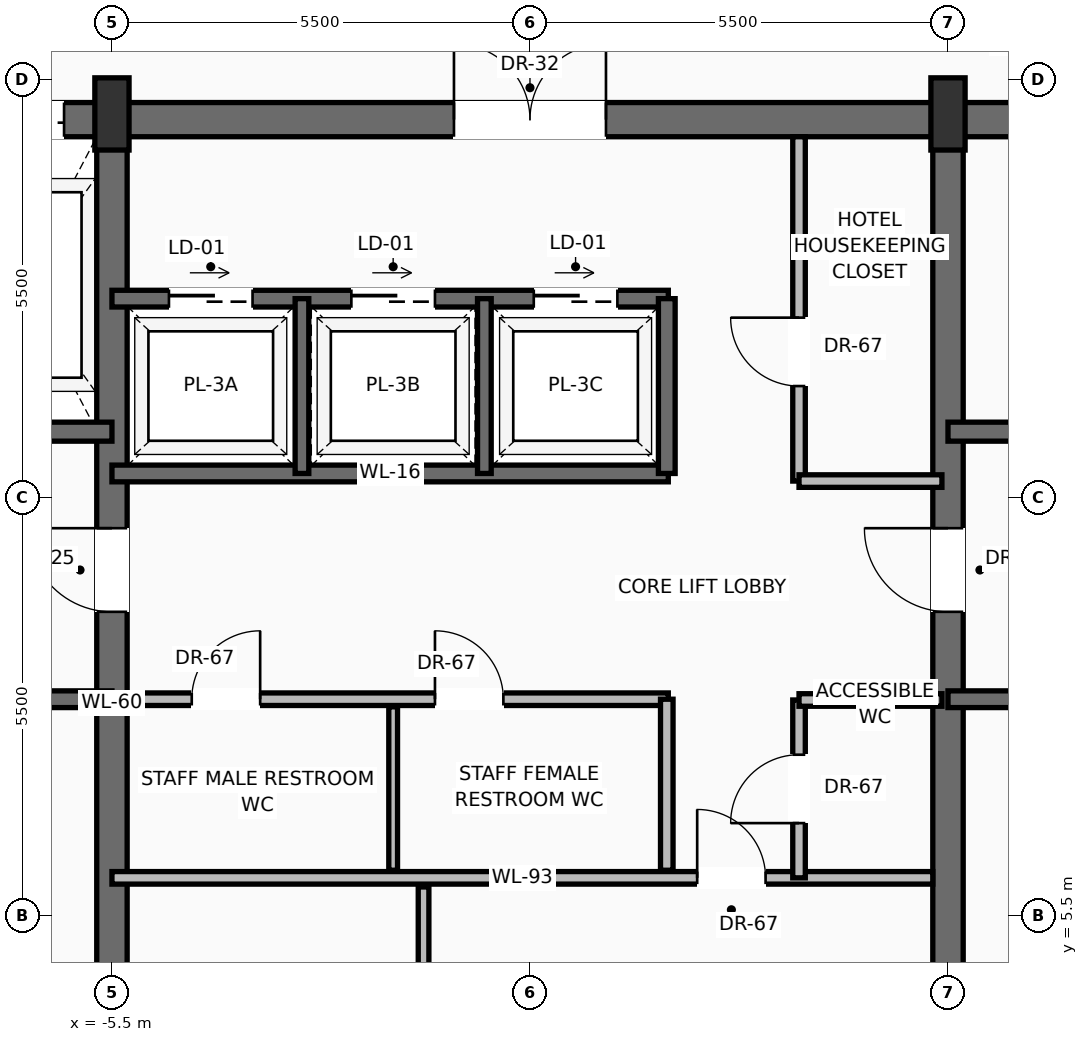
"""IFC4 building model, lengths in metres.
Left out: names, types, materials, properties, quantities, classifications, styles, units other than length and angle.
Written with IfcOpenShell. Run it as: python <this file> out.ifc"""

import sys

from ifc_helpers import new_model, si_unit, direction, frame, frame_2d, origin, origin_2d, place, context, subcontext, project, spatial, rectangle, extrude, source, transform, mapped, element, fill, save


model = new_model("IFC4")
c1 = context("Model", 3, precision=1e-05, world=origin(), true_north=direction((0.0, 1.0)))
c2 = subcontext(c1, "Body", "Model", "MODEL_VIEW")
j1 = project(units=[si_unit("LENGTHUNIT", "METRE"), si_unit("PLANEANGLEUNIT", "RADIAN")], contexts=[c1])
p1 = place(None, origin())
s1 = spatial("IfcSite", under=j1, at=p1, CompositionType="ELEMENT")
p2 = place(p1, origin())
s2 = spatial("IfcBuilding", under=s1, at=p2, CompositionType="ELEMENT")
p3 = place(p2, frame((0.0, 0.0, 269.55)))
s3 = spatial("IfcBuildingStorey", under=s2, at=p3, CompositionType="ELEMENT", Elevation=269.55)
p4 = place(p3, frame((-10.6, 15.975, 0.0), z_axis=(0.0, 0.0, 1.0), x_axis=(1.0, 0.0, 0.0)))
e1 = element("IfcWall", 1, at=p4, inside=s3, PredefinedType="SHEAR", context=c2, shape_type="SweptSolid", body=[
    extrude(rectangle(XDim=21.2, YDim=0.45, at=frame_2d((10.6, 0.0))), origin(), (0.0, 0.0, 1.0), 3.24),
])
p5 = place(p4, frame((3.17, 0.0, 0.0)))
e2 = element("IfcOpeningElement", 2, at=p5, cuts=e1, PredefinedType="OPENING", context=c2, shape_type="SweptSolid", body=[
    extrude(rectangle(XDim=1.3, YDim=2.3, at=frame_2d((0.65, 1.15))), frame((0.0, 0.235, 0.0), z_axis=(0.0, -1.0, 0.0), x_axis=(1.0, 0.0, 0.0)), (0.0, 0.0, 1.0), 0.47),
])
p6 = place(p4, frame((9.6, 0.0, 0.0)))
e3 = element("IfcOpeningElement", 3, at=p6, cuts=e1, PredefinedType="OPENING", context=c2, shape_type="SweptSolid", body=[
    extrude(rectangle(XDim=2.0, YDim=2.4, at=frame_2d((1.0, 1.2))), frame((0.0, 0.235, 0.0), z_axis=(0.0, -1.0, 0.0), x_axis=(1.0, 0.0, 0.0)), (0.0, 0.0, 1.0), 0.47),
])
p7 = place(p3, frame((-5.5, 0.625, 0.0), z_axis=(0.0, 0.0, 1.0), x_axis=(0.0, 1.0, 0.0)))
e4 = element("IfcWall", 4, at=p7, inside=s3, PredefinedType="SHEAR", context=c2, shape_type="SweptSolid", body=[
    extrude(rectangle(XDim=15.35, YDim=0.4, at=frame_2d((7.675, 0.0))), origin(), (0.0, 0.0, 1.0), 3.24),
])
p8 = place(p7, frame((8.875, 0.0, 0.0)))
e5 = element("IfcOpeningElement", 5, at=p8, cuts=e4, PredefinedType="OPENING", context=c2, shape_type="SweptSolid", body=[
    extrude(rectangle(XDim=1.1, YDim=2.2, at=frame_2d((0.55, 1.1))), frame((0.0, 0.21, 0.0), z_axis=(0.0, -1.0, 0.0), x_axis=(1.0, 0.0, 0.0)), (0.0, 0.0, 1.0), 0.42),
])
p9 = place(p3, frame((5.5, 0.625, 0.0), z_axis=(0.0, 0.0, 1.0), x_axis=(0.0, 1.0, 0.0)))
e6 = element("IfcWall", 6, at=p9, inside=s3, PredefinedType="SHEAR", context=c2, shape_type="SweptSolid", body=[
    extrude(rectangle(XDim=15.35, YDim=0.4, at=frame_2d((7.675, 0.0))), origin(), (0.0, 0.0, 1.0), 3.24),
])
p10 = place(p9, frame((8.875, 0.0, 0.0)))
e7 = element("IfcOpeningElement", 7, at=p10, cuts=e6, PredefinedType="OPENING", context=c2, shape_type="SweptSolid", body=[
    extrude(rectangle(XDim=1.1, YDim=2.2, at=frame_2d((0.55, 1.1))), frame((0.0, 0.21, 0.0), z_axis=(0.0, -1.0, 0.0), x_axis=(1.0, 0.0, 0.0)), (0.0, 0.0, 1.0), 0.42),
])
m1 = source(origin(), c2, "Body", "SweptSolid", [
    extrude(rectangle(XDim=0.45, YDim=0.95, at=origin_2d()), origin(), (0.0, 0.0, 1.0), 3.45),
])
for number, where, z_axis, x_axis in (
    (8, (-5.5, 16.05, 0.0), (0.0, 0.0, 1.0), (1.0, 0.0, 0.0)),
    (9, (5.5, 16.05, 0.0), (0.0, 0.0, 1.0), (1.0, 0.0, 0.0)),
):
    element("IfcColumn", number, at=place(p3, frame(where, z_axis=z_axis, x_axis=x_axis)), inside=s3, PredefinedType="PILASTER", context=c2, shape_type="MappedRepresentation", body=[
        mapped(m1, transform((0.0, 0.0, 0.0), scale=1.0)),
    ])
p11 = place(p3, frame((-5.5, 8.35, 0.0), z_axis=(0.0, 0.0, 1.0), x_axis=(-1.0, 0.0, 0.0)))
e10 = element("IfcWall", 10, at=p11, inside=s3, PredefinedType="SOLIDWALL", context=c2, shape_type="SweptSolid", body=[
    extrude(rectangle(XDim=4.65, YDim=0.22, at=frame_2d((2.325, 0.0))), origin(), (0.0, 0.0, 1.0), 3.24),
])
p12 = place(p11, frame((2.5, 0.0, 0.0)))
e11 = element("IfcOpeningElement", 11, at=p12, cuts=e10, PredefinedType="OPENING", context=c2, shape_type="SweptSolid", body=[
    extrude(rectangle(XDim=1.15, YDim=2.2, at=frame_2d((0.575, 1.1))), frame((0.0, 0.12, 0.0), z_axis=(0.0, -1.0, 0.0), x_axis=(1.0, 0.0, 0.0)), (0.0, 0.0, 1.0), 0.24),
])
p13 = place(p3, frame((-5.5, 11.87, 0.0), z_axis=(0.0, 0.0, 1.0), x_axis=(-1.0, 0.0, 0.0)))
e12 = element("IfcWall", 12, at=p13, inside=s3, PredefinedType="SOLIDWALL", context=c2, shape_type="SweptSolid", body=[
    extrude(rectangle(XDim=4.65, YDim=0.25, at=frame_2d((2.325, 0.0))), origin(), (0.0, 0.0, 1.0), 3.24),
])
p14 = place(p13, frame((2.95, 0.0, 0.0)))
e13 = element("IfcOpeningElement", 13, at=p14, cuts=e12, PredefinedType="OPENING", context=c2, shape_type="SweptSolid", body=[
    extrude(rectangle(XDim=1.2, YDim=2.25, at=frame_2d((0.6, 1.125))), frame((0.0, 0.135, 0.0), z_axis=(0.0, -1.0, 0.0), x_axis=(1.0, 0.0, 0.0)), (0.0, 0.0, 1.0), 0.27),
])
p15 = place(p3, frame((10.15, 8.35, 0.0), z_axis=(0.0, 0.0, 1.0), x_axis=(-1.0, 0.0, 0.0)))
e14 = element("IfcWall", 14, at=p15, inside=s3, PredefinedType="SOLIDWALL", context=c2, shape_type="SweptSolid", body=[
    extrude(rectangle(XDim=4.65, YDim=0.22, at=frame_2d((2.325, 0.0))), origin(), (0.0, 0.0, 1.0), 3.24),
])
p16 = place(p15, frame((1.0, 0.0, 0.0)))
e15 = element("IfcOpeningElement", 15, at=p16, cuts=e14, PredefinedType="OPENING", context=c2, shape_type="SweptSolid", body=[
    extrude(rectangle(XDim=1.15, YDim=2.2, at=frame_2d((0.575, 1.1))), frame((0.0, 0.12, 0.0), z_axis=(0.0, -1.0, 0.0), x_axis=(1.0, 0.0, 0.0)), (0.0, 0.0, 1.0), 0.24),
])
p17 = place(p3, frame((10.15, 11.87, 0.0), z_axis=(0.0, 0.0, 1.0), x_axis=(-1.0, 0.0, 0.0)))
e16 = element("IfcWall", 16, at=p17, inside=s3, PredefinedType="SOLIDWALL", context=c2, shape_type="SweptSolid", body=[
    extrude(rectangle(XDim=4.65, YDim=0.25, at=frame_2d((2.325, 0.0))), origin(), (0.0, 0.0, 1.0), 3.24),
])
p18 = place(p17, frame((0.5, 0.0, 0.0)))
e17 = element("IfcOpeningElement", 17, at=p18, cuts=e16, PredefinedType="OPENING", context=c2, shape_type="SweptSolid", body=[
    extrude(rectangle(XDim=1.2, YDim=2.25, at=frame_2d((0.6, 1.125))), frame((0.0, 0.135, 0.0), z_axis=(0.0, -1.0, 0.0), x_axis=(1.0, 0.0, 0.0)), (0.0, 0.0, 1.0), 0.27),
])
p19 = place(p3, frame((-5.5, 6.0, 0.0), z_axis=(0.0, 0.0, 1.0), x_axis=(1.0, 0.0, 0.0)))
e18 = element("IfcWall", 18, at=p19, inside=s3, PredefinedType="PARTITIONING", context=c2, shape_type="SweptSolid", body=[
    extrude(rectangle(XDim=10.8, YDim=0.165, at=frame_2d((5.4, 0.0))), origin(), (0.0, 0.0, 1.0), 3.232),
])
p20 = place(p19, frame((7.7, 0.0, 0.0)))
e19 = element("IfcOpeningElement", 19, at=p20, cuts=e18, PredefinedType="OPENING", context=c2, shape_type="SweptSolid", body=[
    extrude(rectangle(XDim=0.9, YDim=2.1, at=frame_2d((0.45, 1.05))), frame((0.0, 0.093, 0.0), z_axis=(0.0, -1.0, 0.0), x_axis=(1.0, 0.0, 0.0)), (0.0, 0.0, 1.0), 0.185),
])
p21 = place(p3, frame((-1.4, 0.85, 0.0), z_axis=(0.0, 0.0, 1.0), x_axis=(0.0, 1.0, 0.0)))
e20 = element("IfcWall", 20, at=p21, inside=s3, PredefinedType="PARTITIONING", context=c2, shape_type="SweptSolid", body=[
    extrude(rectangle(XDim=5.03, YDim=0.14, at=frame_2d((2.515, 0.0))), origin(), (0.0, 0.0, 1.0), 3.232),
])
p22 = place(p21, frame((2.1, 0.0, 0.0)))
e21 = element("IfcOpeningElement", 21, at=p22, cuts=e20, PredefinedType="OPENING", context=c2, shape_type="SweptSolid", body=[
    extrude(rectangle(XDim=0.9, YDim=2.1, at=frame_2d((0.45, 1.05))), frame((0.0, 0.08, 0.0), z_axis=(0.0, -1.0, 0.0), x_axis=(1.0, 0.0, 0.0)), (0.0, 0.0, 1.0), 0.16),
])
p23 = place(p3, frame((3.54, 6.0, 0.0), z_axis=(0.0, 0.0, 1.0), x_axis=(0.0, 1.0, 0.0)))
e22 = element("IfcWall", 22, at=p23, inside=s3, PredefinedType="PARTITIONING", context=c2, shape_type="SweptSolid", body=[
    extrude(rectangle(XDim=2.34, YDim=0.165, at=frame_2d((1.17, 0.0))), origin(), (0.0, 0.0, 1.0), 3.232),
])
p24 = place(p23, frame((0.72, 0.0, 0.0)))
e23 = element("IfcOpeningElement", 23, at=p24, cuts=e22, PredefinedType="OPENING", context=c2, shape_type="SweptSolid", body=[
    extrude(rectangle(XDim=0.9, YDim=2.1, at=frame_2d((0.45, 1.05))), frame((0.0, 0.093, 0.0), z_axis=(0.0, -1.0, 0.0), x_axis=(1.0, 0.0, 0.0)), (0.0, 0.0, 1.0), 0.185),
])
p25 = place(p3, frame((3.54, 8.34, 0.0), z_axis=(0.0, 0.0, 1.0), x_axis=(1.0, 0.0, 0.0)))
e24 = element("IfcWall", 24, at=p25, inside=s3, PredefinedType="PARTITIONING", context=c2, shape_type="SweptSolid", body=[
    extrude(rectangle(XDim=1.88, YDim=0.165, at=frame_2d((0.94, 0.0))), origin(), (0.0, 0.0, 1.0), 3.232),
])
p26 = place(p3, frame((-5.3, 8.35, 0.0), z_axis=(0.0, 0.0, 1.0), x_axis=(1.0, 0.0, 0.0)))
e25 = element("IfcWall", 25, at=p26, inside=s3, PredefinedType="PARTITIONING", context=c2, shape_type="SweptSolid", body=[
    extrude(rectangle(XDim=7.12, YDim=0.165, at=frame_2d((3.56, 0.0))), origin(), (0.0, 0.0, 1.0), 3.232),
])
p27 = place(p26, frame((0.85, 0.0, 0.0)))
e26 = element("IfcOpeningElement", 26, at=p27, cuts=e25, PredefinedType="OPENING", context=c2, shape_type="SweptSolid", body=[
    extrude(rectangle(XDim=0.9, YDim=2.1, at=frame_2d((0.45, 1.05))), frame((0.0, 0.093, 0.0), z_axis=(0.0, -1.0, 0.0), x_axis=(1.0, 0.0, 0.0)), (0.0, 0.0, 1.0), 0.185),
])
p28 = place(p26, frame((4.05, 0.0, 0.0)))
e27 = element("IfcOpeningElement", 27, at=p28, cuts=e25, PredefinedType="OPENING", context=c2, shape_type="SweptSolid", body=[
    extrude(rectangle(XDim=0.9, YDim=2.1, at=frame_2d((0.45, 1.05))), frame((0.0, 0.093, 0.0), z_axis=(0.0, -1.0, 0.0), x_axis=(1.0, 0.0, 0.0)), (0.0, 0.0, 1.0), 0.185),
])
p29 = place(p3, frame((1.8, 6.1, 0.0), z_axis=(0.0, 0.0, 1.0), x_axis=(0.0, 1.0, 0.0)))
e28 = element("IfcWall", 28, at=p29, inside=s3, PredefinedType="PARTITIONING", context=c2, shape_type="SweptSolid", body=[
    extrude(rectangle(XDim=2.25, YDim=0.165, at=frame_2d((1.125, 0.0))), origin(), (0.0, 0.0, 1.0), 3.232),
])
p30 = place(p3, frame((-1.8, 6.1, 0.0), z_axis=(0.0, 0.0, 1.0), x_axis=(0.0, 1.0, 0.0)))
e29 = element("IfcWall", 29, at=p30, inside=s3, PredefinedType="PARTITIONING", context=c2, shape_type="SweptSolid", body=[
    extrude(rectangle(XDim=2.15, YDim=0.115, at=frame_2d((1.075, 0.0))), origin(), (0.0, 0.0, 1.0), 3.232),
])
p31 = place(p3, frame((-5.5, 11.32, 0.0), z_axis=(0.0, 0.0, 1.0), x_axis=(1.0, 0.0, 0.0)))
e30 = element("IfcWall", 30, at=p31, inside=s3, PredefinedType="SOLIDWALL", context=c2, shape_type="SweptSolid", body=[
    extrude(rectangle(XDim=7.32, YDim=0.22, at=frame_2d((3.66, 0.0))), origin(), (0.0, 0.0, 1.0), 3.24),
])
p32 = place(p3, frame((-5.5, 13.62, 0.0), z_axis=(0.0, 0.0, 1.0), x_axis=(1.0, 0.0, 0.0)))
e31 = element("IfcWall", 31, at=p32, inside=s3, PredefinedType="SOLIDWALL", context=c2, shape_type="SweptSolid", body=[
    extrude(rectangle(XDim=7.32, YDim=0.22, at=frame_2d((3.66, 0.0))), origin(), (0.0, 0.0, 1.0), 3.24),
])
p33 = place(p32, frame((0.75, 0.0, 0.0)))
e32 = element("IfcOpeningElement", 32, at=p33, cuts=e31, PredefinedType="OPENING", context=c2, shape_type="SweptSolid", body=[
    extrude(rectangle(XDim=1.1, YDim=2.2, at=frame_2d((0.55, 1.1))), frame((0.0, 0.12, 0.0), z_axis=(0.0, -1.0, 0.0), x_axis=(1.0, 0.0, 0.0)), (0.0, 0.0, 1.0), 0.24),
])
p34 = place(p32, frame((3.15, 0.0, 0.0)))
e33 = element("IfcOpeningElement", 33, at=p34, cuts=e31, PredefinedType="OPENING", context=c2, shape_type="SweptSolid", body=[
    extrude(rectangle(XDim=1.1, YDim=2.2, at=frame_2d((0.55, 1.1))), frame((0.0, 0.12, 0.0), z_axis=(0.0, -1.0, 0.0), x_axis=(1.0, 0.0, 0.0)), (0.0, 0.0, 1.0), 0.24),
])
p35 = place(p32, frame((5.55, 0.0, 0.0)))
e34 = element("IfcOpeningElement", 34, at=p35, cuts=e31, PredefinedType="OPENING", context=c2, shape_type="SweptSolid", body=[
    extrude(rectangle(XDim=1.1, YDim=2.2, at=frame_2d((0.55, 1.1))), frame((0.0, 0.12, 0.0), z_axis=(0.0, -1.0, 0.0), x_axis=(1.0, 0.0, 0.0)), (0.0, 0.0, 1.0), 0.24),
])
p36 = place(p3, frame((1.8, 11.32, 0.0), z_axis=(0.0, 0.0, 1.0), x_axis=(0.0, 1.0, 0.0)))
e35 = element("IfcWall", 35, at=p36, inside=s3, PredefinedType="SOLIDWALL", context=c2, shape_type="SweptSolid", body=[
    extrude(rectangle(XDim=2.3, YDim=0.22, at=frame_2d((1.15, 0.0))), origin(), (0.0, 0.0, 1.0), 3.24),
])
for number, where, z_axis, x_axis in (
    (36, (-3.0, 11.32, 0.0), (0.0, 0.0, 1.0), (0.0, 1.0, 0.0)),
    (37, (-0.6, 11.32, 0.0), (0.0, 0.0, 1.0), (0.0, 1.0, 0.0)),
):
    element("IfcWall", number, at=place(p3, frame(where, z_axis=z_axis, x_axis=x_axis)), inside=s3, PredefinedType="SOLIDWALL", context=c2, shape_type="SweptSolid", body=[
        extrude(rectangle(XDim=2.3, YDim=0.18, at=frame_2d((1.15, 0.0))), origin(), (0.0, 0.0, 1.0), 3.24),
    ])
p37 = place(p3, frame((3.54, 11.22, 0.0), z_axis=(0.0, 0.0, 1.0), x_axis=(0.0, 1.0, 0.0)))
e38 = element("IfcWall", 38, at=p37, inside=s3, PredefinedType="PARTITIONING", context=c2, shape_type="SweptSolid", body=[
    extrude(rectangle(XDim=4.53, YDim=0.165, at=frame_2d((2.265, 0.0))), origin(), (0.0, 0.0, 1.0), 3.232),
])
p38 = place(p37, frame((1.25, 0.0, 0.0)))
e39 = element("IfcOpeningElement", 39, at=p38, cuts=e38, PredefinedType="OPENING", context=c2, shape_type="SweptSolid", body=[
    extrude(rectangle(XDim=0.9, YDim=2.1, at=frame_2d((0.45, 1.05))), frame((0.0, 0.093, 0.0), z_axis=(0.0, -1.0, 0.0), x_axis=(1.0, 0.0, 0.0)), (0.0, 0.0, 1.0), 0.185),
])
p39 = place(p3, frame((3.54, 11.22, 0.0), z_axis=(0.0, 0.0, 1.0), x_axis=(1.0, 0.0, 0.0)))
e40 = element("IfcWall", 40, at=p39, inside=s3, PredefinedType="PARTITIONING", context=c2, shape_type="SweptSolid", body=[
    extrude(rectangle(XDim=1.88, YDim=0.165, at=frame_2d((0.94, 0.0))), origin(), (0.0, 0.0, 1.0), 3.232),
])
m2 = source(origin(), c2, "Body", "SweptSolid", [
    extrude(rectangle(XDim=1.1, YDim=2.2, at=frame_2d((0.55, 1.1))), frame((0.0, 0.025, 0.0), z_axis=(0.0, -1.0, 0.0), x_axis=(1.0, 0.0, 0.0)), (0.0, 0.0, 1.0), 0.05),
])
p40 = place(p8, origin())
e41 = element("IfcDoor", 41, at=p40, inside=s3, OperationType="SINGLE_SWING_RIGHT", PredefinedType="DOOR", context=c2, shape_type="MappedRepresentation", body=[
    mapped(m2, transform((0.0, 0.0, 0.0), scale=1.0)),
])
fill(e5, e41)
m3 = source(origin(), c2, "Body", "SweptSolid", [
    extrude(rectangle(XDim=1.3, YDim=2.3, at=frame_2d((0.65, 1.15))), frame((0.0, 0.025, 0.0), z_axis=(0.0, -1.0, 0.0), x_axis=(1.0, 0.0, 0.0)), (0.0, 0.0, 1.0), 0.05),
])
p41 = place(p5, origin())
e42 = element("IfcDoor", 42, at=p41, inside=s3, OperationType="SLIDING_TO_RIGHT", PredefinedType="DOOR", context=c2, shape_type="MappedRepresentation", body=[
    mapped(m3, transform((0.0, 0.0, 0.0), scale=1.0)),
])
fill(e2, e42)
p42 = place(p10, origin())
e43 = element("IfcDoor", 43, at=p42, inside=s3, OperationType="SINGLE_SWING_RIGHT", PredefinedType="DOOR", context=c2, shape_type="MappedRepresentation", body=[
    mapped(m2, transform((0.0, 0.0, 0.0), scale=1.0)),
])
fill(e7, e43)
m4 = source(origin(), c2, "Body", "SweptSolid", [
    extrude(rectangle(XDim=2.0, YDim=2.4, at=frame_2d((1.0, 1.2))), frame((0.0, 0.025, 0.0), z_axis=(0.0, -1.0, 0.0), x_axis=(1.0, 0.0, 0.0)), (0.0, 0.0, 1.0), 0.05),
])
p43 = place(p6, origin())
e44 = element("IfcDoor", 44, at=p43, inside=s3, OperationType="DOUBLE_DOOR_SINGLE_SWING", PredefinedType="DOOR", context=c2, shape_type="MappedRepresentation", body=[
    mapped(m4, transform((0.0, 0.0, 0.0), scale=1.0)),
])
fill(e3, e44)
m5 = source(origin(), c2, "Body", "SweptSolid", [
    extrude(rectangle(XDim=0.9, YDim=2.1, at=frame_2d((0.45, 1.05))), frame((0.0, 0.025, 0.0), z_axis=(0.0, -1.0, 0.0), x_axis=(1.0, 0.0, 0.0)), (0.0, 0.0, 1.0), 0.05),
])
p44 = place(p20, origin())
e45 = element("IfcDoor", 45, at=p44, inside=s3, OperationType="SINGLE_SWING_LEFT", PredefinedType="DOOR", context=c2, shape_type="MappedRepresentation", body=[
    mapped(m5, transform((0.0, 0.0, 0.0), scale=1.0)),
])
fill(e19, e45)
p45 = place(p24, origin())
e46 = element("IfcDoor", 46, at=p45, inside=s3, OperationType="SINGLE_SWING_LEFT", PredefinedType="DOOR", context=c2, shape_type="MappedRepresentation", body=[
    mapped(m5, transform((0.0, 0.0, 0.0), scale=1.0)),
])
fill(e23, e46)
p46 = place(p27, origin())
e47 = element("IfcDoor", 47, at=p46, inside=s3, OperationType="SINGLE_SWING_RIGHT", PredefinedType="DOOR", context=c2, shape_type="MappedRepresentation", body=[
    mapped(m5, transform((0.0, 0.0, 0.0), scale=1.0)),
])
fill(e26, e47)
p47 = place(p28, origin())
e48 = element("IfcDoor", 48, at=p47, inside=s3, OperationType="SINGLE_SWING_LEFT", PredefinedType="DOOR", context=c2, shape_type="MappedRepresentation", body=[
    mapped(m5, transform((0.0, 0.0, 0.0), scale=1.0)),
])
fill(e27, e48)
m6 = source(origin(), c2, "Body", "SweptSolid", [
    extrude(rectangle(XDim=1.1, YDim=2.2, at=frame_2d((0.55, 1.1))), frame((0.0, 0.025, 0.0), z_axis=(0.0, -1.0, 0.0), x_axis=(1.0, 0.0, 0.0)), (0.0, 0.0, 1.0), 0.05),
])
p48 = place(p33, origin())
e49 = element("IfcDoor", 49, at=p48, inside=s3, OperationType="SLIDING_TO_RIGHT", PredefinedType="DOOR", context=c2, shape_type="MappedRepresentation", body=[
    mapped(m6, transform((0.0, 0.0, 0.0), scale=1.0)),
])
fill(e32, e49)
p49 = place(p34, origin())
e50 = element("IfcDoor", 50, at=p49, inside=s3, OperationType="SLIDING_TO_RIGHT", PredefinedType="DOOR", context=c2, shape_type="MappedRepresentation", body=[
    mapped(m6, transform((0.0, 0.0, 0.0), scale=1.0)),
])
fill(e33, e50)
p50 = place(p35, origin())
e51 = element("IfcDoor", 51, at=p50, inside=s3, OperationType="SLIDING_TO_RIGHT", PredefinedType="DOOR", context=c2, shape_type="MappedRepresentation", body=[
    mapped(m6, transform((0.0, 0.0, 0.0), scale=1.0)),
])
fill(e34, e51)
p51 = place(p38, origin())
e52 = element("IfcDoor", 52, at=p51, inside=s3, OperationType="SINGLE_SWING_RIGHT", PredefinedType="DOOR", context=c2, shape_type="MappedRepresentation", body=[
    mapped(m5, transform((0.0, 0.0, 0.0), scale=1.0)),
])
fill(e39, e52)
save(model, sys.argv[1])
